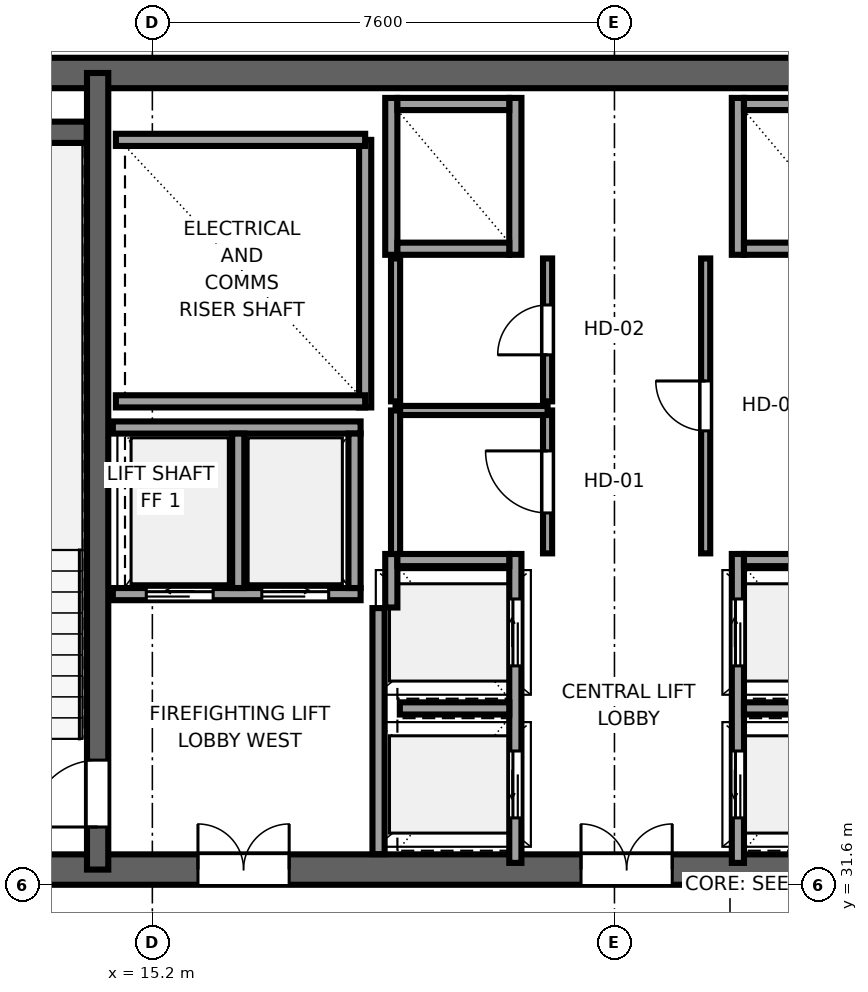
"""IFC4 building model, lengths in metres.
Left out: names, types, materials, properties, quantities, classifications, styles, units other than length and angle.
Written with IfcOpenShell. Run it as: python <this file> out.ifc"""

import sys

from ifc_helpers import new_model, si_unit, direction, frame, frame_2d, origin, place, context, subcontext, project, spatial, rectangle, extrude, source, transform, mapped, element, fill, save


model = new_model("IFC4")
c1 = context("Model", 3, precision=1e-05, world=origin(), true_north=direction((0.0, 1.0)))
c2 = subcontext(c1, "Body", "Model", "MODEL_VIEW")
j1 = project(units=[si_unit("LENGTHUNIT", "METRE"), si_unit("PLANEANGLEUNIT", "RADIAN")], contexts=[c1])
p1 = place(None, origin())
s1 = spatial("IfcSite", under=j1, at=p1, CompositionType="ELEMENT")
p2 = place(p1, origin())
s2 = spatial("IfcBuilding", under=s1, at=p2, CompositionType="ELEMENT")
p3 = place(p2, frame((0.0, 0.0, 234.55)))
s3 = spatial("IfcBuildingStorey", under=s2, at=p3, CompositionType="ELEMENT", Elevation=234.55)
p4 = place(p3, frame((10.0, 31.85, 0.0), z_axis=(0.0, 0.0, 1.0), x_axis=(1.0, 0.0, 0.0)))
e1 = element("IfcWall", 1, at=p4, inside=s3, PredefinedType="SHEAR", context=c2, shape_type="SweptSolid", body=[
    extrude(rectangle(XDim=26.0, YDim=0.5, at=frame_2d((13.0, 0.0))), origin(), (0.0, 0.0, 1.0), 3.55),
])
p5 = place(p4, frame((7.45, 0.0, 0.0), z_axis=(0.0, 0.0, 1.0), x_axis=(-1.0, 0.0, 0.0)))
e2 = element("IfcOpeningElement", 2, at=p5, cuts=e1, PredefinedType="OPENING", context=c2, shape_type="SweptSolid", body=[
    extrude(rectangle(XDim=1.5, YDim=2.04, at=frame_2d((0.75, 1.02))), frame((0.0, 0.26, 0.0), z_axis=(0.0, -1.0, 0.0), x_axis=(1.0, 0.0, 0.0)), (0.0, 0.0, 1.0), 0.52),
])
p6 = place(p4, frame((13.75, 0.0, 0.0), z_axis=(0.0, 0.0, 1.0), x_axis=(-1.0, 0.0, 0.0)))
e3 = element("IfcOpeningElement", 3, at=p6, cuts=e1, PredefinedType="OPENING", context=c2, shape_type="SweptSolid", body=[
    extrude(rectangle(XDim=1.5, YDim=2.04, at=frame_2d((0.75, 1.02))), frame((0.0, 0.26, 0.0), z_axis=(0.0, -1.0, 0.0), x_axis=(1.0, 0.0, 0.0)), (0.0, 0.0, 1.0), 0.52),
])
p7 = place(p4, frame((20.05, 0.0, 0.0), z_axis=(0.0, 0.0, 1.0), x_axis=(-1.0, 0.0, 0.0)))
e4 = element("IfcOpeningElement", 4, at=p7, cuts=e1, PredefinedType="OPENING", context=c2, shape_type="SweptSolid", body=[
    extrude(rectangle(XDim=1.5, YDim=2.04, at=frame_2d((0.75, 1.02))), frame((0.0, 0.26, 0.0), z_axis=(0.0, -1.0, 0.0), x_axis=(1.0, 0.0, 0.0)), (0.0, 0.0, 1.0), 0.52),
])
p8 = place(p3, frame((10.0, 44.95, 0.0), z_axis=(0.0, 0.0, 1.0), x_axis=(1.0, 0.0, 0.0)))
e5 = element("IfcWall", 5, at=p8, inside=s3, PredefinedType="SHEAR", context=c2, shape_type="SweptSolid", body=[
    extrude(rectangle(XDim=26.0, YDim=0.5, at=frame_2d((13.0, 0.0))), origin(), (0.0, 0.0, 1.0), 3.55),
])
p9 = place(p3, frame((14.3, 31.85, 0.0), z_axis=(0.0, 0.0, 1.0), x_axis=(0.0, 1.0, 0.0)))
e6 = element("IfcWall", 6, at=p9, inside=s3, PredefinedType="SHEAR", context=c2, shape_type="SweptSolid", body=[
    extrude(rectangle(XDim=13.1, YDim=0.35, at=frame_2d((6.55, 0.0))), origin(), (0.0, 0.0, 1.0), 3.55),
])
p10 = place(p9, frame((0.7, 0.0, 0.0)))
e7 = element("IfcOpeningElement", 7, at=p10, cuts=e6, PredefinedType="OPENING", context=c2, shape_type="SweptSolid", body=[
    extrude(rectangle(XDim=1.1, YDim=2.12, at=frame_2d((0.55, 1.06))), frame((0.0, 0.185, 0.0), z_axis=(0.0, -1.0, 0.0), x_axis=(1.0, 0.0, 0.0)), (0.0, 0.0, 1.0), 0.37),
])
p11 = place(p3, frame((10.52, 43.975, 0.0), z_axis=(0.0, 0.0, 1.0), x_axis=(1.0, 0.0, 0.0)))
e8 = element("IfcWall", 8, at=p11, inside=s3, PredefinedType="SHEAR", context=c2, shape_type="SweptSolid", body=[
    extrude(rectangle(XDim=3.6, YDim=0.35, at=frame_2d((1.8, 0.0))), origin(), (0.0, 0.0, 1.0), 3.55),
])
p12 = place(p3, frame((18.7, 39.45, 0.0), z_axis=(0.0, 0.0, 1.0), x_axis=(0.0, 1.0, 0.0)))
e9 = element("IfcWall", 9, at=p12, inside=s3, PredefinedType="SOLIDWALL", context=c2, shape_type="SweptSolid", body=[
    extrude(rectangle(XDim=4.4, YDim=0.2, at=frame_2d((2.2, 0.0))), origin(), (0.0, 0.0, 1.0), 3.37),
])
for number, where, z_axis, x_axis in (
    (10, (14.6, 39.55, 0.0), (0.0, 0.0, 1.0), (1.0, 0.0, 0.0)),
    (11, (14.6, 43.85, 0.0), (0.0, 0.0, 1.0), (1.0, 0.0, 0.0)),
):
    element("IfcWall", number, at=place(p3, frame(where, z_axis=z_axis, x_axis=x_axis)), inside=s3, PredefinedType="SOLIDWALL", context=c2, shape_type="SweptSolid", body=[
        extrude(rectangle(XDim=4.1, YDim=0.2, at=frame_2d((2.05, 0.0))), origin(), (0.0, 0.0, 1.0), 3.37),
    ])
p13 = place(p3, frame((18.92, 32.104, 0.0), z_axis=(0.0, 0.0, 1.0), x_axis=(0.0, 1.0, 0.0)))
e12 = element("IfcWall", 12, at=p13, inside=s3, PredefinedType="SOLIDWALL", context=c2, shape_type="SweptSolid", body=[
    extrude(rectangle(XDim=4.046, YDim=0.2, at=frame_2d((2.023, 0.0))), origin(), (0.0, 0.0, 1.0), 3.37),
])
p14 = place(p3, frame((21.17, 31.96, 0.0), z_axis=(0.0, 0.0, 1.0), x_axis=(0.0, 1.0, 0.0)))
e13 = element("IfcWall", 13, at=p14, inside=s3, PredefinedType="SOLIDWALL", context=c2, shape_type="SweptSolid", body=[
    extrude(rectangle(XDim=5.08, YDim=0.2, at=frame_2d((2.54, 0.0))), origin(), (0.0, 0.0, 1.0), 3.37),
])
p15 = place(p14, frame((0.74, 0.0, 0.0)))
e14 = element("IfcOpeningElement", 14, at=p15, cuts=e13, PredefinedType="OPENING", context=c2, shape_type="SweptSolid", body=[
    extrude(rectangle(XDim=1.1, YDim=2.12, at=frame_2d((0.55, 1.06))), frame((0.0, 0.11, 0.0), z_axis=(0.0, -1.0, 0.0), x_axis=(1.0, 0.0, 0.0)), (0.0, 0.0, 1.0), 0.22),
])
p16 = place(p14, frame((3.24, 0.0, 0.0)))
e15 = element("IfcOpeningElement", 15, at=p16, cuts=e13, PredefinedType="OPENING", context=c2, shape_type="SweptSolid", body=[
    extrude(rectangle(XDim=1.1, YDim=2.12, at=frame_2d((0.55, 1.06))), frame((0.0, 0.11, 0.0), z_axis=(0.0, -1.0, 0.0), x_axis=(1.0, 0.0, 0.0)), (0.0, 0.0, 1.0), 0.22),
])
p17 = place(p3, frame((19.13, 36.16, 0.0), z_axis=(0.0, 0.0, 1.0), x_axis=(0.0, 1.0, 0.0)))
e16 = element("IfcWall", 16, at=p17, inside=s3, PredefinedType="SOLIDWALL", context=c2, shape_type="SweptSolid", body=[
    extrude(rectangle(XDim=0.88, YDim=0.2, at=frame_2d((0.44, 0.0))), origin(), (0.0, 0.0, 1.0), 3.37),
])
p18 = place(p3, frame((19.23, 36.94, 0.0), z_axis=(0.0, 0.0, 1.0), x_axis=(1.0, 0.0, 0.0)))
e17 = element("IfcWall", 17, at=p18, inside=s3, PredefinedType="SOLIDWALL", context=c2, shape_type="SweptSolid", body=[
    extrude(rectangle(XDim=1.84, YDim=0.2, at=frame_2d((0.92, 0.0))), origin(), (0.0, 0.0, 1.0), 3.37),
])
p19 = place(p3, frame((19.27, 34.5, 0.0), z_axis=(0.0, 0.0, 1.0), x_axis=(1.0, 0.0, 0.0)))
e18 = element("IfcWall", 18, at=p19, inside=s3, PredefinedType="SOLIDWALL", context=c2, shape_type="SweptSolid", body=[
    extrude(rectangle(XDim=1.8, YDim=0.2, at=frame_2d((0.9, 0.0))), origin(), (0.0, 0.0, 1.0), 3.37),
])
for number, where, z_axis, x_axis in (
    (19, (21.17, 41.96, 0.0), (0.0, 0.0, 1.0), (0.0, 1.0, 0.0)),
    (20, (19.13, 41.96, 0.0), (0.0, 0.0, 1.0), (0.0, 1.0, 0.0)),
):
    element("IfcWall", number, at=place(p3, frame(where, z_axis=z_axis, x_axis=x_axis)), inside=s3, PredefinedType="SOLIDWALL", context=c2, shape_type="SweptSolid", body=[
        extrude(rectangle(XDim=2.58, YDim=0.2, at=frame_2d((1.29, 0.0))), origin(), (0.0, 0.0, 1.0), 3.37),
    ])
for number, where, z_axis, x_axis in (
    (21, (19.23, 42.06, 0.0), (0.0, 0.0, 1.0), (1.0, 0.0, 0.0)),
    (22, (19.23, 44.44, 0.0), (0.0, 0.0, 1.0), (1.0, 0.0, 0.0)),
):
    element("IfcWall", number, at=place(p3, frame(where, z_axis=z_axis, x_axis=x_axis)), inside=s3, PredefinedType="SOLIDWALL", context=c2, shape_type="SweptSolid", body=[
        extrude(rectangle(XDim=1.84, YDim=0.2, at=frame_2d((0.92, 0.0))), origin(), (0.0, 0.0, 1.0), 3.37),
    ])
p20 = place(p3, frame((14.55, 36.38, 0.0), z_axis=(0.0, 0.0, 1.0), x_axis=(1.0, 0.0, 0.0)))
e23 = element("IfcWall", 23, at=p20, inside=s3, PredefinedType="SOLIDWALL", context=c2, shape_type="SweptSolid", body=[
    extrude(rectangle(XDim=4.075, YDim=0.2, at=frame_2d((2.038, 0.0))), origin(), (0.0, 0.0, 1.0), 3.37),
])
p21 = place(p20, frame((0.55, 0.0, 0.0)))
e24 = element("IfcOpeningElement", 24, at=p21, cuts=e23, PredefinedType="OPENING", context=c2, shape_type="SweptSolid", body=[
    extrude(rectangle(XDim=1.1, YDim=2.12, at=frame_2d((0.55, 1.06))), frame((0.0, 0.11, 0.0), z_axis=(0.0, -1.0, 0.0), x_axis=(1.0, 0.0, 0.0)), (0.0, 0.0, 1.0), 0.22),
])
p22 = place(p20, frame((2.45, 0.0, 0.0)))
e25 = element("IfcOpeningElement", 25, at=p22, cuts=e23, PredefinedType="OPENING", context=c2, shape_type="SweptSolid", body=[
    extrude(rectangle(XDim=1.1, YDim=2.12, at=frame_2d((0.55, 1.06))), frame((0.0, 0.11, 0.0), z_axis=(0.0, -1.0, 0.0), x_axis=(1.0, 0.0, 0.0)), (0.0, 0.0, 1.0), 0.22),
])
p23 = place(p3, frame((14.55, 39.12, 0.0), z_axis=(0.0, 0.0, 1.0), x_axis=(1.0, 0.0, 0.0)))
e26 = element("IfcWall", 26, at=p23, inside=s3, PredefinedType="SOLIDWALL", context=c2, shape_type="SweptSolid", body=[
    extrude(rectangle(XDim=4.075, YDim=0.2, at=frame_2d((2.038, 0.0))), origin(), (0.0, 0.0, 1.0), 3.37),
])
for number, where, z_axis, x_axis in (
    (27, (18.525, 36.48, 0.0), (0.0, 0.0, 1.0), (0.0, 1.0, 0.0)),
    (28, (16.613, 36.48, 0.0), (0.0, 0.0, 1.0), (0.0, 1.0, 0.0)),
):
    element("IfcWall", number, at=place(p3, frame(where, z_axis=z_axis, x_axis=x_axis)), inside=s3, PredefinedType="SOLIDWALL", context=c2, shape_type="SweptSolid", body=[
        extrude(rectangle(XDim=2.54, YDim=0.2, at=frame_2d((1.27, 0.0))), origin(), (0.0, 0.0, 1.0), 3.37),
    ])
p24 = place(p3, frame((24.83, 31.96, 0.0), z_axis=(0.0, 0.0, 1.0), x_axis=(0.0, 1.0, 0.0)))
e29 = element("IfcWall", 29, at=p24, inside=s3, PredefinedType="SOLIDWALL", context=c2, shape_type="SweptSolid", body=[
    extrude(rectangle(XDim=5.08, YDim=0.2, at=frame_2d((2.54, 0.0))), origin(), (0.0, 0.0, 1.0), 3.37),
])
p25 = place(p24, frame((0.74, 0.0, 0.0)))
e30 = element("IfcOpeningElement", 30, at=p25, cuts=e29, PredefinedType="OPENING", context=c2, shape_type="SweptSolid", body=[
    extrude(rectangle(XDim=1.1, YDim=2.12, at=frame_2d((0.55, 1.06))), frame((0.0, 0.11, 0.0), z_axis=(0.0, -1.0, 0.0), x_axis=(1.0, 0.0, 0.0)), (0.0, 0.0, 1.0), 0.22),
])
p26 = place(p24, frame((3.24, 0.0, 0.0)))
e31 = element("IfcOpeningElement", 31, at=p26, cuts=e29, PredefinedType="OPENING", context=c2, shape_type="SweptSolid", body=[
    extrude(rectangle(XDim=1.1, YDim=2.12, at=frame_2d((0.55, 1.06))), frame((0.0, 0.11, 0.0), z_axis=(0.0, -1.0, 0.0), x_axis=(1.0, 0.0, 0.0)), (0.0, 0.0, 1.0), 0.22),
])
p27 = place(p3, frame((24.93, 36.94, 0.0), z_axis=(0.0, 0.0, 1.0), x_axis=(1.0, 0.0, 0.0)))
e32 = element("IfcWall", 32, at=p27, inside=s3, PredefinedType="SOLIDWALL", context=c2, shape_type="SweptSolid", body=[
    extrude(rectangle(XDim=1.84, YDim=0.2, at=frame_2d((0.92, 0.0))), origin(), (0.0, 0.0, 1.0), 3.37),
])
p28 = place(p3, frame((24.93, 34.5, 0.0), z_axis=(0.0, 0.0, 1.0), x_axis=(1.0, 0.0, 0.0)))
e33 = element("IfcWall", 33, at=p28, inside=s3, PredefinedType="SOLIDWALL", context=c2, shape_type="SweptSolid", body=[
    extrude(rectangle(XDim=1.8, YDim=0.2, at=frame_2d((0.9, 0.0))), origin(), (0.0, 0.0, 1.0), 3.37),
])
p29 = place(p3, frame((24.83, 41.96, 0.0), z_axis=(0.0, 0.0, 1.0), x_axis=(0.0, 1.0, 0.0)))
e34 = element("IfcWall", 34, at=p29, inside=s3, PredefinedType="SOLIDWALL", context=c2, shape_type="SweptSolid", body=[
    extrude(rectangle(XDim=2.58, YDim=0.2, at=frame_2d((1.29, 0.0))), origin(), (0.0, 0.0, 1.0), 3.37),
])
for number, where, z_axis, x_axis in (
    (35, (24.93, 42.06, 0.0), (0.0, 0.0, 1.0), (1.0, 0.0, 0.0)),
    (36, (24.93, 44.44, 0.0), (0.0, 0.0, 1.0), (1.0, 0.0, 0.0)),
):
    element("IfcWall", number, at=place(p3, frame(where, z_axis=z_axis, x_axis=x_axis)), inside=s3, PredefinedType="SOLIDWALL", context=c2, shape_type="SweptSolid", body=[
        extrude(rectangle(XDim=1.84, YDim=0.2, at=frame_2d((0.92, 0.0))), origin(), (0.0, 0.0, 1.0), 3.37),
    ])
p30 = place(p3, frame((21.7, 37.05, 0.0), z_axis=(0.0, 0.0, 1.0), x_axis=(0.0, 1.0, 0.0)))
e37 = element("IfcWall", 37, at=p30, inside=s3, PredefinedType="PARTITIONING", context=c2, shape_type="SweptSolid", body=[
    extrude(rectangle(XDim=2.35, YDim=0.15, at=frame_2d((1.175, 0.0))), origin(), (0.0, 0.0, 1.0), 3.37),
])
p31 = place(p30, frame((0.665, 0.0, 0.0)))
e38 = element("IfcOpeningElement", 38, at=p31, cuts=e37, PredefinedType="OPENING", context=c2, shape_type="SweptSolid", body=[
    extrude(rectangle(XDim=1.02, YDim=2.03, at=frame_2d((0.51, 1.015))), frame((0.0, 0.085, 0.0), z_axis=(0.0, -1.0, 0.0), x_axis=(1.0, 0.0, 0.0)), (0.0, 0.0, 1.0), 0.17),
])
p32 = place(p3, frame((19.2, 39.4, 0.0), z_axis=(0.0, 0.0, 1.0), x_axis=(1.0, 0.0, 0.0)))
e39 = element("IfcWall", 39, at=p32, inside=s3, PredefinedType="PARTITIONING", context=c2, shape_type="SweptSolid", body=[
    extrude(rectangle(XDim=2.5, YDim=0.15, at=frame_2d((1.25, 0.0))), origin(), (0.0, 0.0, 1.0), 3.37),
])
p33 = place(p3, frame((19.2, 37.04, 0.0), z_axis=(0.0, 0.0, 1.0), x_axis=(0.0, 1.0, 0.0)))
e40 = element("IfcWall", 40, at=p33, inside=s3, PredefinedType="PARTITIONING", context=c2, shape_type="SweptSolid", body=[
    extrude(rectangle(XDim=2.36, YDim=0.15, at=frame_2d((1.18, 0.0))), origin(), (0.0, 0.0, 1.0), 3.37),
])
p34 = place(p3, frame((21.7, 39.55, 0.0), z_axis=(0.0, 0.0, 1.0), x_axis=(0.0, 1.0, 0.0)))
e41 = element("IfcWall", 41, at=p34, inside=s3, PredefinedType="PARTITIONING", context=c2, shape_type="SweptSolid", body=[
    extrude(rectangle(XDim=2.35, YDim=0.15, at=frame_2d((1.175, 0.0))), origin(), (0.0, 0.0, 1.0), 3.37),
])
p35 = place(p34, frame((0.765, 0.0, 0.0)))
e42 = element("IfcOpeningElement", 42, at=p35, cuts=e41, PredefinedType="OPENING", context=c2, shape_type="SweptSolid", body=[
    extrude(rectangle(XDim=0.82, YDim=2.01, at=frame_2d((0.41, 1.005))), frame((0.0, 0.085, 0.0), z_axis=(0.0, -1.0, 0.0), x_axis=(1.0, 0.0, 0.0)), (0.0, 0.0, 1.0), 0.17),
])
p36 = place(p3, frame((19.2, 39.55, 0.0), z_axis=(0.0, 0.0, 1.0), x_axis=(0.0, 1.0, 0.0)))
e43 = element("IfcWall", 43, at=p36, inside=s3, PredefinedType="PARTITIONING", context=c2, shape_type="SweptSolid", body=[
    extrude(rectangle(XDim=2.35, YDim=0.15, at=frame_2d((1.175, 0.0))), origin(), (0.0, 0.0, 1.0), 3.37),
])
p37 = place(p3, frame((24.3, 37.05, 0.0), z_axis=(0.0, 0.0, 1.0), x_axis=(0.0, 1.0, 0.0)))
e44 = element("IfcWall", 44, at=p37, inside=s3, PredefinedType="PARTITIONING", context=c2, shape_type="SweptSolid", body=[
    extrude(rectangle(XDim=4.85, YDim=0.15, at=frame_2d((2.425, 0.0))), origin(), (0.0, 0.0, 1.0), 3.37),
])
p38 = place(p37, frame((2.015, 0.0, 0.0)))
e45 = element("IfcOpeningElement", 45, at=p38, cuts=e44, PredefinedType="OPENING", context=c2, shape_type="SweptSolid", body=[
    extrude(rectangle(XDim=0.82, YDim=2.01, at=frame_2d((0.41, 1.005))), frame((0.0, 0.085, 0.0), z_axis=(0.0, -1.0, 0.0), x_axis=(1.0, 0.0, 0.0)), (0.0, 0.0, 1.0), 0.17),
])
m1 = source(origin(), c2, "Body", "SweptSolid", [
    extrude(rectangle(XDim=1.1, YDim=2.12, at=frame_2d((0.55, 1.06))), frame((0.0, 0.025, 0.0), z_axis=(0.0, -1.0, 0.0), x_axis=(1.0, 0.0, 0.0)), (0.0, 0.0, 1.0), 0.05),
])
p39 = place(p10, origin())
e46 = element("IfcDoor", 46, at=p39, inside=s3, OperationType="SINGLE_SWING_LEFT", PredefinedType="DOOR", context=c2, shape_type="MappedRepresentation", body=[
    mapped(m1, transform((0.0, 0.0, 0.0), x_axis=(1.0, 0.0, 0.0), y_axis=(0.0, 1.0, 0.0), z_axis=(0.0, 0.0, 1.0), scale=1.0)),
])
fill(e7, e46)
m2 = source(origin(), c2, "Body", "SweptSolid", [
    extrude(rectangle(XDim=1.5, YDim=2.04, at=frame_2d((0.75, 1.02))), frame((0.0, 0.025, 0.0), z_axis=(0.0, -1.0, 0.0), x_axis=(1.0, 0.0, 0.0)), (0.0, 0.0, 1.0), 0.05),
])
p40 = place(p5, origin())
e47 = element("IfcDoor", 47, at=p40, inside=s3, OperationType="DOUBLE_DOOR_SINGLE_SWING", PredefinedType="DOOR", context=c2, shape_type="MappedRepresentation", body=[
    mapped(m2, transform((0.0, 0.0, 0.0), x_axis=(1.0, 0.0, 0.0), y_axis=(0.0, 1.0, 0.0), z_axis=(0.0, 0.0, 1.0), scale=1.0)),
])
fill(e2, e47)
p41 = place(p6, origin())
e48 = element("IfcDoor", 48, at=p41, inside=s3, OperationType="DOUBLE_DOOR_SINGLE_SWING", PredefinedType="DOOR", context=c2, shape_type="MappedRepresentation", body=[
    mapped(m2, transform((0.0, 0.0, 0.0), x_axis=(1.0, 0.0, 0.0), y_axis=(0.0, 1.0, 0.0), z_axis=(0.0, 0.0, 1.0), scale=1.0)),
])
fill(e3, e48)
m3 = source(origin(), c2, "Body", "SweptSolid", [
    extrude(rectangle(XDim=1.1, YDim=2.12, at=frame_2d((0.55, 1.06))), frame((0.0, 0.025, 0.0), z_axis=(0.0, -1.0, 0.0), x_axis=(1.0, 0.0, 0.0)), (0.0, 0.0, 1.0), 0.05),
])
p42 = place(p15, origin())
e49 = element("IfcDoor", 49, at=p42, inside=s3, OperationType="SLIDING_TO_LEFT", PredefinedType="DOOR", context=c2, shape_type="MappedRepresentation", body=[
    mapped(m3, transform((0.0, 0.0, 0.0), x_axis=(1.0, 0.0, 0.0), y_axis=(0.0, 1.0, 0.0), z_axis=(0.0, 0.0, 1.0), scale=1.0)),
])
fill(e14, e49)
p43 = place(p16, origin())
e50 = element("IfcDoor", 50, at=p43, inside=s3, OperationType="SLIDING_TO_RIGHT", PredefinedType="DOOR", context=c2, shape_type="MappedRepresentation", body=[
    mapped(m3, transform((0.0, 0.0, 0.0), x_axis=(1.0, 0.0, 0.0), y_axis=(0.0, 1.0, 0.0), z_axis=(0.0, 0.0, 1.0), scale=1.0)),
])
fill(e15, e50)
p44 = place(p21, origin())
e51 = element("IfcDoor", 51, at=p44, inside=s3, OperationType="SLIDING_TO_LEFT", PredefinedType="DOOR", context=c2, shape_type="MappedRepresentation", body=[
    mapped(m3, transform((0.0, 0.0, 0.0), x_axis=(1.0, 0.0, 0.0), y_axis=(0.0, 1.0, 0.0), z_axis=(0.0, 0.0, 1.0), scale=1.0)),
])
fill(e24, e51)
p45 = place(p22, origin())
e52 = element("IfcDoor", 52, at=p45, inside=s3, OperationType="SLIDING_TO_RIGHT", PredefinedType="DOOR", context=c2, shape_type="MappedRepresentation", body=[
    mapped(m3, transform((0.0, 0.0, 0.0), x_axis=(1.0, 0.0, 0.0), y_axis=(0.0, 1.0, 0.0), z_axis=(0.0, 0.0, 1.0), scale=1.0)),
])
fill(e25, e52)
p46 = place(p25, origin())
e53 = element("IfcDoor", 53, at=p46, inside=s3, OperationType="SLIDING_TO_LEFT", PredefinedType="DOOR", context=c2, shape_type="MappedRepresentation", body=[
    mapped(m3, transform((0.0, 0.0, 0.0), x_axis=(1.0, 0.0, 0.0), y_axis=(0.0, 1.0, 0.0), z_axis=(0.0, 0.0, 1.0), scale=1.0)),
])
fill(e30, e53)
p47 = place(p26, origin())
e54 = element("IfcDoor", 54, at=p47, inside=s3, OperationType="SLIDING_TO_RIGHT", PredefinedType="DOOR", context=c2, shape_type="MappedRepresentation", body=[
    mapped(m3, transform((0.0, 0.0, 0.0), x_axis=(1.0, 0.0, 0.0), y_axis=(0.0, 1.0, 0.0), z_axis=(0.0, 0.0, 1.0), scale=1.0)),
])
fill(e31, e54)
m4 = source(origin(), c2, "Body", "SweptSolid", [
    extrude(rectangle(XDim=1.02, YDim=2.03, at=frame_2d((0.51, 1.015))), frame((0.0, 0.025, 0.0), z_axis=(0.0, -1.0, 0.0), x_axis=(1.0, 0.0, 0.0)), (0.0, 0.0, 1.0), 0.05),
])
p48 = place(p31, origin())
e55 = element("IfcDoor", 55, at=p48, inside=s3, OperationType="SINGLE_SWING_RIGHT", PredefinedType="DOOR", context=c2, shape_type="MappedRepresentation", body=[
    mapped(m4, transform((0.0, 0.0, 0.0), x_axis=(1.0, 0.0, 0.0), y_axis=(0.0, 1.0, 0.0), z_axis=(0.0, 0.0, 1.0), scale=1.0)),
])
fill(e38, e55)
m5 = source(origin(), c2, "Body", "SweptSolid", [
    extrude(rectangle(XDim=0.82, YDim=2.01, at=frame_2d((0.41, 1.005))), frame((0.0, 0.025, 0.0), z_axis=(0.0, -1.0, 0.0), x_axis=(1.0, 0.0, 0.0)), (0.0, 0.0, 1.0), 0.05),
])
p49 = place(p35, origin())
e56 = element("IfcDoor", 56, at=p49, inside=s3, OperationType="SINGLE_SWING_LEFT", PredefinedType="DOOR", context=c2, shape_type="MappedRepresentation", body=[
    mapped(m5, transform((0.0, 0.0, 0.0), x_axis=(1.0, 0.0, 0.0), y_axis=(0.0, 1.0, 0.0), z_axis=(0.0, 0.0, 1.0), scale=1.0)),
])
fill(e42, e56)
p50 = place(p38, origin())
e57 = element("IfcDoor", 57, at=p50, inside=s3, OperationType="SINGLE_SWING_RIGHT", PredefinedType="DOOR", context=c2, shape_type="MappedRepresentation", body=[
    mapped(m5, transform((0.0, 0.0, 0.0), x_axis=(1.0, 0.0, 0.0), y_axis=(0.0, 1.0, 0.0), z_axis=(0.0, 0.0, 1.0), scale=1.0)),
])
fill(e45, e57)
save(model, sys.argv[1])
